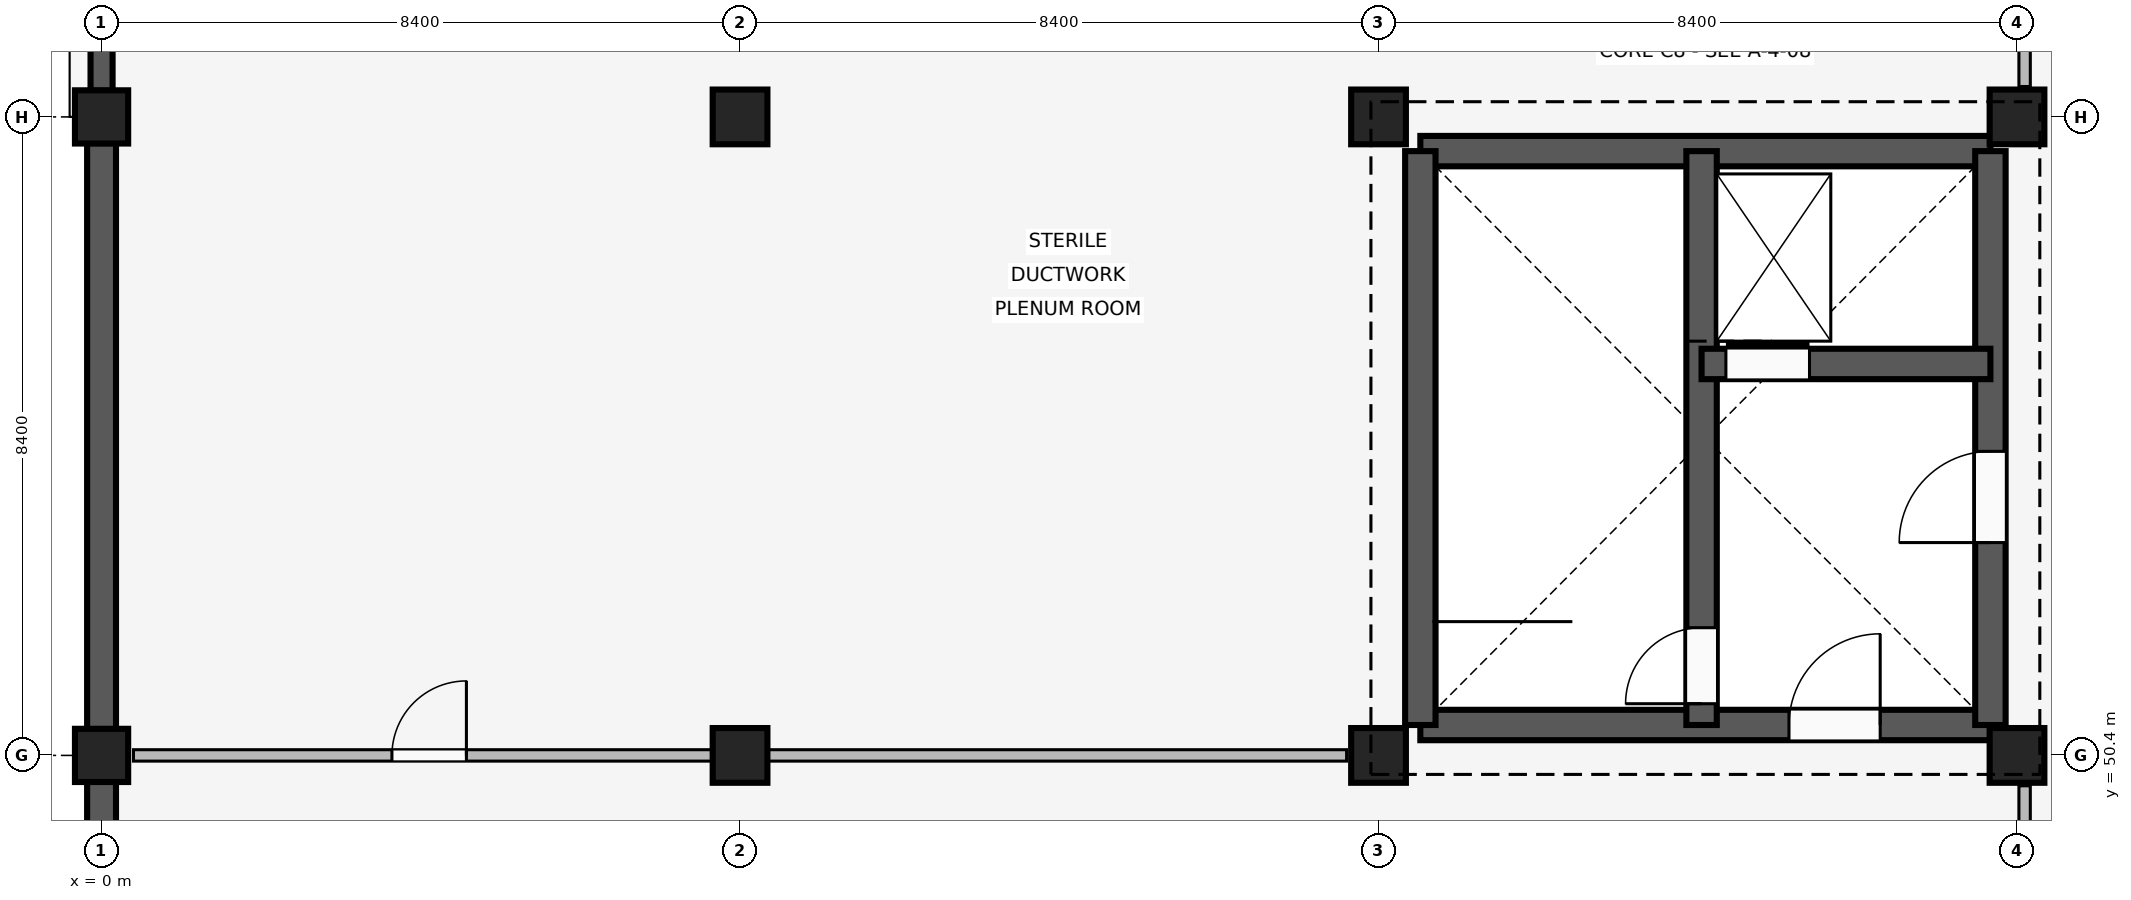
"""IFC4 building model, lengths in metres.
Left out: names, types, materials, properties, quantities, classifications, styles, units other than length and angle.
Written with IfcOpenShell. Run it as: python <this file> out.ifc"""

import sys

from ifc_helpers import new_model, si_unit, direction, frame, frame_2d, origin, origin_2d, place, context, subcontext, project, spatial, rectangle, extrude, element, fill, save


model = new_model("IFC4")
c1 = context("Model", 3, precision=1e-05, world=origin(), true_north=direction((0.0, 1.0)))
c2 = subcontext(c1, "Body", "Model", "MODEL_VIEW")
j1 = project(units=[si_unit("LENGTHUNIT", "METRE"), si_unit("PLANEANGLEUNIT", "RADIAN")], contexts=[c1])
p1 = place(None, origin())
s1 = spatial("IfcSite", under=j1, at=p1, CompositionType="ELEMENT")
p2 = place(p1, origin())
s2 = spatial("IfcBuilding", under=s1, at=p2, CompositionType="ELEMENT")
p3 = place(p2, frame((0.0, 0.0, 12.9)))
s3 = spatial("IfcBuildingStorey", under=s2, at=p3, CompositionType="ELEMENT", Elevation=12.9)
for number, where, z_axis, x_axis in (
    (1, (0.0, 50.4, 0.0), (0.0, 0.0, 1.0), (1.0, 0.0, 0.0)),
    (2, (0.0, 58.8, 0.0), (0.0, 0.0, 1.0), (1.0, 0.0, 0.0)),
):
    element("IfcColumn", number, at=place(p3, frame(where, z_axis=z_axis, x_axis=x_axis)), inside=s3, PredefinedType="COLUMN", context=c2, shape_type="SweptSolid", body=[
        extrude(rectangle(XDim=0.7, YDim=0.7, at=origin_2d()), origin(), (0.0, 0.0, 1.0), 3.3),
    ])
for number, where, z_axis, x_axis in (
    (3, (8.4, 50.4, 0.0), (0.0, 0.0, 1.0), (1.0, 0.0, 0.0)),
    (4, (8.4, 58.8, 0.0), (0.0, 0.0, 1.0), (1.0, 0.0, 0.0)),
    (5, (16.8, 50.4, 0.0), (0.0, 0.0, 1.0), (1.0, 0.0, 0.0)),
    (6, (16.8, 58.8, 0.0), (0.0, 0.0, 1.0), (1.0, 0.0, 0.0)),
    (7, (25.2, 50.4, 0.0), (0.0, 0.0, 1.0), (1.0, 0.0, 0.0)),
    (8, (25.2, 58.8, 0.0), (0.0, 0.0, 1.0), (1.0, 0.0, 0.0)),
):
    element("IfcColumn", number, at=place(p3, frame(where, z_axis=z_axis, x_axis=x_axis)), inside=s3, PredefinedType="COLUMN", context=c2, shape_type="SweptSolid", body=[
        extrude(rectangle(XDim=0.72, YDim=0.72, at=origin_2d()), origin(), (0.0, 0.0, 1.0), 3.3),
    ])
for number, where, z_axis, x_axis in (
    (9, (0.0, 42.345, 0.0), (0.0, 0.0, 1.0), (0.0, 1.0, 0.0)),
    (10, (0.0, 50.745, 0.0), (0.0, 0.0, 1.0), (0.0, 1.0, 0.0)),
):
    element("IfcWall", number, at=place(p3, frame(where, z_axis=z_axis, x_axis=x_axis)), inside=s3, PredefinedType="SOLIDWALL", context=c2, shape_type="SweptSolid", body=[
        extrude(rectangle(XDim=7.71, YDim=0.38, at=frame_2d((3.855, 0.0))), origin(), (0.0, 0.0, 1.0), 2.44),
    ])
p4 = place(p3, frame((0.0, 59.145, 0.0), z_axis=(0.0, 0.0, 1.0), x_axis=(0.0, 1.0, 0.0)))
e11 = element("IfcWall", 11, at=p4, inside=s3, PredefinedType="SOLIDWALL", context=c2, shape_type="SweptSolid", body=[
    extrude(rectangle(XDim=7.71, YDim=0.29, at=frame_2d((3.855, 0.0))), origin(), (0.0, 0.0, 1.0), 2.44),
])
p5 = place(p4, frame((1.2, 0.0, 1.05)))
e12 = element("IfcOpeningElement", 12, at=p5, cuts=e11, PredefinedType="OPENING", context=c2, shape_type="SweptSolid", body=[
    extrude(rectangle(XDim=1.3, YDim=0.75, at=frame_2d((0.65, 0.375))), frame((0.0, 0.155, 0.0), z_axis=(0.0, -1.0, 0.0), x_axis=(1.0, 0.0, 0.0)), (0.0, 0.0, 1.0), 0.31),
])
p6 = place(p4, frame((5.21, 0.0, 1.05)))
e13 = element("IfcOpeningElement", 13, at=p6, cuts=e11, PredefinedType="OPENING", context=c2, shape_type="SweptSolid", body=[
    extrude(rectangle(XDim=1.3, YDim=0.75, at=frame_2d((0.65, 0.375))), frame((0.0, 0.155, 0.0), z_axis=(0.0, -1.0, 0.0), x_axis=(1.0, 0.0, 0.0)), (0.0, 0.0, 1.0), 0.31),
])
p7 = place(p3, frame((17.35, 50.8, 0.0), z_axis=(0.0, 0.0, 1.0), x_axis=(1.0, 0.0, 0.0)))
e14 = element("IfcWall", 14, at=p7, inside=s3, PredefinedType="SHEAR", context=c2, shape_type="SweptSolid", body=[
    extrude(rectangle(XDim=7.5, YDim=0.4, at=frame_2d((3.75, 0.0))), origin(), (0.0, 0.0, 1.0), 3.02),
])
p8 = place(p7, frame((4.85, 0.0, 0.0)))
e15 = element("IfcOpeningElement", 15, at=p8, cuts=e14, PredefinedType="OPENING", context=c2, shape_type="SweptSolid", body=[
    extrude(rectangle(XDim=1.2, YDim=2.2, at=frame_2d((0.6, 1.1))), frame((0.0, 0.21, 0.0), z_axis=(0.0, -1.0, 0.0), x_axis=(1.0, 0.0, 0.0)), (0.0, 0.0, 1.0), 0.42),
])
p9 = place(p3, frame((17.35, 58.35, 0.0), z_axis=(0.0, 0.0, 1.0), x_axis=(1.0, 0.0, 0.0)))
e16 = element("IfcWall", 16, at=p9, inside=s3, PredefinedType="SHEAR", context=c2, shape_type="SweptSolid", body=[
    extrude(rectangle(XDim=7.5, YDim=0.4, at=frame_2d((3.75, 0.0))), origin(), (0.0, 0.0, 1.0), 3.02),
])
p10 = place(p3, frame((17.35, 50.8, 0.0), z_axis=(0.0, 0.0, 1.0), x_axis=(0.0, 1.0, 0.0)))
e17 = element("IfcWall", 17, at=p10, inside=s3, PredefinedType="SHEAR", context=c2, shape_type="SweptSolid", body=[
    extrude(rectangle(XDim=7.55, YDim=0.4, at=frame_2d((3.775, 0.0))), origin(), (0.0, 0.0, 1.0), 3.02),
])
p11 = place(p3, frame((24.85, 50.8, 0.0), z_axis=(0.0, 0.0, 1.0), x_axis=(0.0, 1.0, 0.0)))
e18 = element("IfcWall", 18, at=p11, inside=s3, PredefinedType="SHEAR", context=c2, shape_type="SweptSolid", body=[
    extrude(rectangle(XDim=7.55, YDim=0.4, at=frame_2d((3.775, 0.0))), origin(), (0.0, 0.0, 1.0), 3.02),
])
p12 = place(p11, frame((2.4, 0.0, 0.0)))
e19 = element("IfcOpeningElement", 19, at=p12, cuts=e18, PredefinedType="OPENING", context=c2, shape_type="SweptSolid", body=[
    extrude(rectangle(XDim=1.2, YDim=2.2, at=frame_2d((0.6, 1.1))), frame((0.0, 0.21, 0.0), z_axis=(0.0, -1.0, 0.0), x_axis=(1.0, 0.0, 0.0)), (0.0, 0.0, 1.0), 0.42),
])
p13 = place(p3, frame((21.05, 50.8, 0.0), z_axis=(0.0, 0.0, 1.0), x_axis=(0.0, 1.0, 0.0)))
e20 = element("IfcWall", 20, at=p13, inside=s3, PredefinedType="SHEAR", context=c2, shape_type="SweptSolid", body=[
    extrude(rectangle(XDim=7.55, YDim=0.4, at=frame_2d((3.775, 0.0))), origin(), (0.0, 0.0, 1.0), 3.02),
])
p14 = place(p13, frame((0.28, 0.0, 0.0)))
e21 = element("IfcOpeningElement", 21, at=p14, cuts=e20, PredefinedType="OPENING", context=c2, shape_type="SweptSolid", body=[
    extrude(rectangle(XDim=1.0, YDim=2.15, at=frame_2d((0.5, 1.075))), frame((0.0, 0.21, 0.0), z_axis=(0.0, -1.0, 0.0), x_axis=(1.0, 0.0, 0.0)), (0.0, 0.0, 1.0), 0.42),
])
p15 = place(p3, frame((21.05, 55.55, 0.0), z_axis=(0.0, 0.0, 1.0), x_axis=(1.0, 0.0, 0.0)))
e22 = element("IfcWall", 22, at=p15, inside=s3, PredefinedType="SHEAR", context=c2, shape_type="SweptSolid", body=[
    extrude(rectangle(XDim=3.8, YDim=0.4, at=frame_2d((1.9, 0.0))), origin(), (0.0, 0.0, 1.0), 3.02),
])
p16 = place(p15, frame((0.32, 0.0, 0.0)))
e23 = element("IfcOpeningElement", 23, at=p16, cuts=e22, PredefinedType="OPENING", context=c2, shape_type="SweptSolid", body=[
    extrude(rectangle(XDim=1.1, YDim=2.15, at=frame_2d((0.55, 1.075))), frame((0.0, 0.21, 0.0), z_axis=(0.0, -1.0, 0.0), x_axis=(1.0, 0.0, 0.0)), (0.0, 0.0, 1.0), 0.42),
])
p17 = place(p3, frame((25.3, 34.0, 0.0), z_axis=(0.0, 0.0, 1.0), x_axis=(0.0, 1.0, 0.0)))
e24 = element("IfcWall", 24, at=p17, inside=s3, PredefinedType="PARTITIONING", context=c2, shape_type="SweptSolid", body=[
    extrude(rectangle(XDim=16.0, YDim=0.15, at=frame_2d((8.0, 0.0))), origin(), (0.0, 0.0, 1.0), 2.42),
])
p18 = place(p17, frame((3.4, 0.0, 0.0)))
e25 = element("IfcOpeningElement", 25, at=p18, cuts=e24, PredefinedType="OPENING", context=c2, shape_type="SweptSolid", body=[
    extrude(rectangle(XDim=1.12, YDim=2.15, at=frame_2d((0.56, 1.075))), frame((0.0, 0.085, 0.0), z_axis=(0.0, -1.0, 0.0), x_axis=(1.0, 0.0, 0.0)), (0.0, 0.0, 1.0), 0.17),
])
p19 = place(p3, frame((0.42, 50.4, 0.0), z_axis=(0.0, 0.0, 1.0), x_axis=(1.0, 0.0, 0.0)))
e26 = element("IfcWall", 26, at=p19, inside=s3, PredefinedType="PARTITIONING", context=c2, shape_type="SweptSolid", body=[
    extrude(rectangle(XDim=15.96, YDim=0.15, at=frame_2d((7.98, 0.0))), origin(), (0.0, 0.0, 1.0), 2.42),
])
p20 = place(p19, frame((3.4, 0.0, 0.0)))
e27 = element("IfcOpeningElement", 27, at=p20, cuts=e26, PredefinedType="OPENING", context=c2, shape_type="SweptSolid", body=[
    extrude(rectangle(XDim=0.98, YDim=2.05, at=frame_2d((0.49, 1.025))), frame((0.0, 0.085, 0.0), z_axis=(0.0, -1.0, 0.0), x_axis=(1.0, 0.0, 0.0)), (0.0, 0.0, 1.0), 0.17),
])
p21 = place(p3, frame((25.3, 59.2, 0.0), z_axis=(0.0, 0.0, 1.0), x_axis=(0.0, 1.0, 0.0)))
e28 = element("IfcWall", 28, at=p21, inside=s3, PredefinedType="PARTITIONING", context=c2, shape_type="SweptSolid", body=[
    extrude(rectangle(XDim=24.4, YDim=0.15, at=frame_2d((12.2, 0.0))), origin(), (0.0, 0.0, 1.0), 2.42),
])
p22 = place(p21, frame((3.4, 0.0, 0.0)))
e29 = element("IfcOpeningElement", 29, at=p22, cuts=e28, PredefinedType="OPENING", context=c2, shape_type="SweptSolid", body=[
    extrude(rectangle(XDim=1.15, YDim=2.2, at=frame_2d((0.575, 1.1))), frame((0.0, 0.085, 0.0), z_axis=(0.0, -1.0, 0.0), x_axis=(1.0, 0.0, 0.0)), (0.0, 0.0, 1.0), 0.17),
])
p23 = place(p12, origin())
e30 = element("IfcDoor", 30, at=p23, inside=s3, OperationType="SINGLE_SWING_LEFT", PredefinedType="DOOR", context=c2, shape_type="SweptSolid", body=[
    extrude(rectangle(XDim=1.2, YDim=2.2, at=frame_2d((0.6, 1.1))), frame((0.0, 0.025, 0.0), z_axis=(0.0, -1.0, 0.0), x_axis=(1.0, 0.0, 0.0)), (0.0, 0.0, 1.0), 0.05),
])
fill(e19, e30)
p24 = place(p8, origin())
e31 = element("IfcDoor", 31, at=p24, inside=s3, OperationType="SINGLE_SWING_RIGHT", PredefinedType="DOOR", context=c2, shape_type="SweptSolid", body=[
    extrude(rectangle(XDim=1.2, YDim=2.2, at=frame_2d((0.6, 1.1))), frame((0.0, 0.025, 0.0), z_axis=(0.0, -1.0, 0.0), x_axis=(1.0, 0.0, 0.0)), (0.0, 0.0, 1.0), 0.05),
])
fill(e15, e31)
p25 = place(p14, origin())
e32 = element("IfcDoor", 32, at=p25, inside=s3, OperationType="SINGLE_SWING_LEFT", PredefinedType="DOOR", context=c2, shape_type="SweptSolid", body=[
    extrude(rectangle(XDim=1.0, YDim=2.15, at=frame_2d((0.5, 1.075))), frame((0.0, 0.025, 0.0), z_axis=(0.0, -1.0, 0.0), x_axis=(1.0, 0.0, 0.0)), (0.0, 0.0, 1.0), 0.05),
])
fill(e21, e32)
p26 = place(p16, origin())
e33 = element("IfcDoor", 33, at=p26, inside=s3, OperationType="SLIDING_TO_LEFT", PredefinedType="DOOR", context=c2, shape_type="SweptSolid", body=[
    extrude(rectangle(XDim=1.1, YDim=2.15, at=frame_2d((0.55, 1.075))), frame((0.0, 0.025, 0.0), z_axis=(0.0, -1.0, 0.0), x_axis=(1.0, 0.0, 0.0)), (0.0, 0.0, 1.0), 0.05),
])
fill(e23, e33)
p27 = place(p20, origin())
e34 = element("IfcDoor", 34, at=p27, inside=s3, OperationType="SINGLE_SWING_RIGHT", PredefinedType="DOOR", context=c2, shape_type="SweptSolid", body=[
    extrude(rectangle(XDim=0.98, YDim=2.05, at=frame_2d((0.49, 1.025))), frame((0.0, 0.025, 0.0), z_axis=(0.0, -1.0, 0.0), x_axis=(1.0, 0.0, 0.0)), (0.0, 0.0, 1.0), 0.05),
])
fill(e27, e34)
save(model, sys.argv[1])
